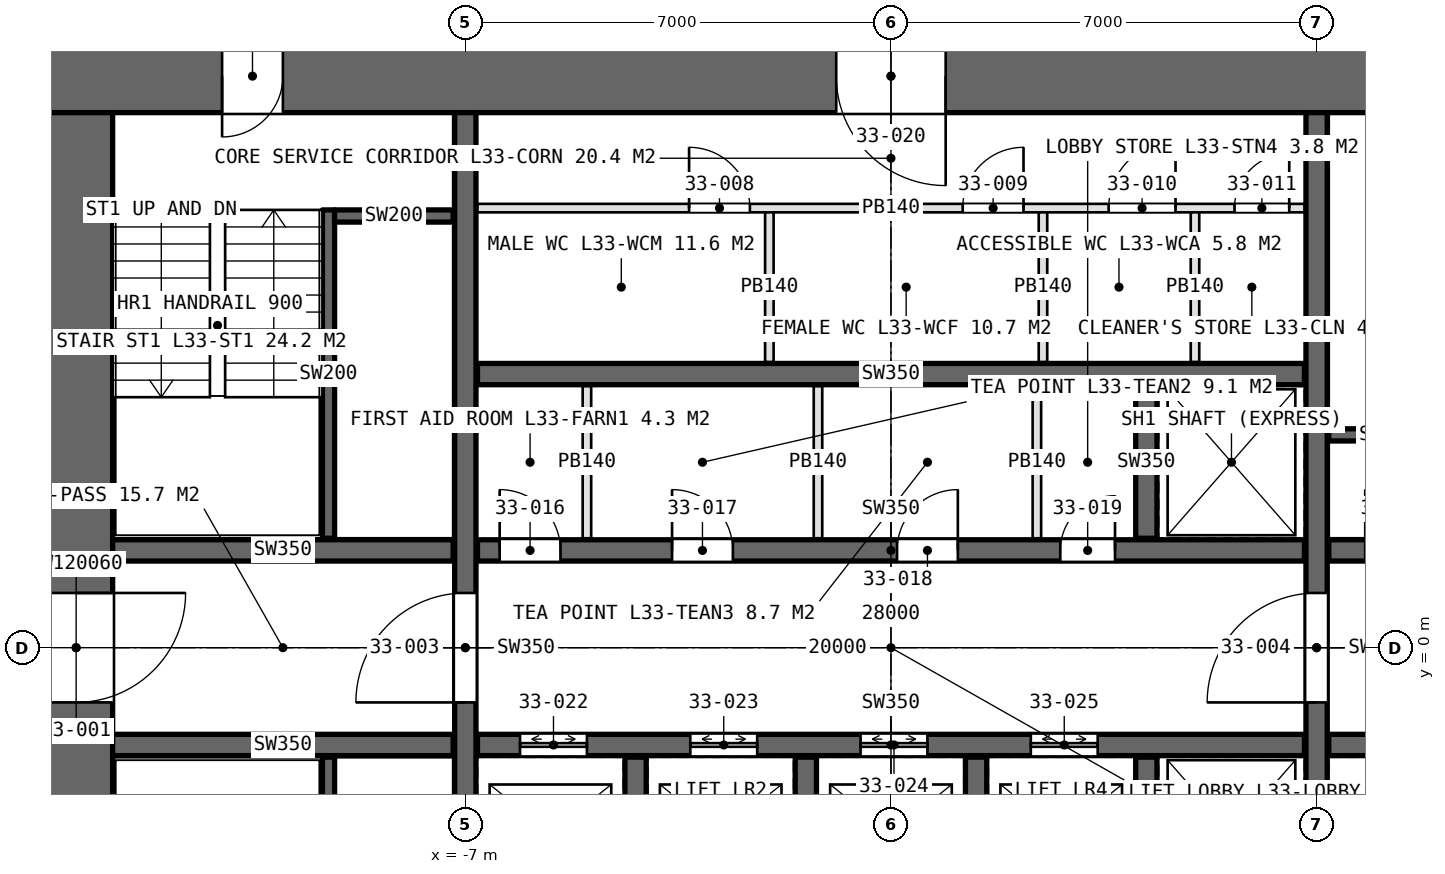
"""IFC4 building model, lengths in metres.
Left out: names, types, materials, properties, quantities, classifications, styles, units other than length and angle.
Written with IfcOpenShell. Run it as: python <this file> out.ifc"""

import sys

from ifc_helpers import new_model, si_unit, direction, frame, frame_2d, origin, place, context, subcontext, project, spatial, rectangle, extrude, element, fill, save


model = new_model("IFC4")
c1 = context("Model", 3, precision=1e-05, world=origin(), true_north=direction((0.0, 1.0)))
c2 = subcontext(c1, "Body", "Model", "MODEL_VIEW")
j1 = project(units=[si_unit("LENGTHUNIT", "METRE"), si_unit("PLANEANGLEUNIT", "RADIAN")], contexts=[c1])
p1 = place(None, origin())
s1 = spatial("IfcSite", under=j1, at=p1, CompositionType="ELEMENT")
p2 = place(p1, origin())
s2 = spatial("IfcBuilding", under=s1, at=p2, CompositionType="ELEMENT")
p3 = place(p2, frame((0.0, 0.0, 155.4)))
s3 = spatial("IfcBuildingStorey", under=s2, at=p3, CompositionType="ELEMENT", Elevation=155.4)
p4 = place(p3, frame((14.0, 9.4, 0.0), z_axis=(0.0, 0.0, 1.0), x_axis=(-1.0, 0.0, 0.0)))
e1 = element("IfcWall", 1, at=p4, inside=s3, PredefinedType="SHEAR", context=c2, shape_type="SweptSolid", body=[
    extrude(rectangle(XDim=28.0, YDim=1.2, at=frame_2d((14.0, 0.0))), origin(), (0.0, 0.0, 1.0), 4.2),
])
p5 = place(p4, frame((24.0, 0.0, 0.0)))
e2 = element("IfcOpeningElement", 2, at=p5, cuts=e1, PredefinedType="OPENING", context=c2, shape_type="SweptSolid", body=[
    extrude(rectangle(XDim=1.0, YDim=2.4, at=frame_2d((0.5, 1.2))), frame((0.0, 0.61, 0.0), z_axis=(0.0, -1.0, 0.0), x_axis=(1.0, 0.0, 0.0)), (0.0, 0.0, 1.0), 1.22),
])
p6 = place(p4, frame((13.1, 0.0, 0.0)))
e3 = element("IfcOpeningElement", 3, at=p6, cuts=e1, PredefinedType="OPENING", context=c2, shape_type="SweptSolid", body=[
    extrude(rectangle(XDim=1.8, YDim=2.4, at=frame_2d((0.9, 1.2))), frame((0.0, 0.61, 0.0), z_axis=(0.0, -1.0, 0.0), x_axis=(1.0, 0.0, 0.0)), (0.0, 0.0, 1.0), 1.22),
])
p7 = place(p3, frame((-13.4, 8.8, 0.0), z_axis=(0.0, 0.0, 1.0), x_axis=(0.0, -1.0, 0.0)))
e4 = element("IfcWall", 4, at=p7, inside=s3, PredefinedType="SHEAR", context=c2, shape_type="SweptSolid", body=[
    extrude(rectangle(XDim=17.6, YDim=1.2, at=frame_2d((8.8, 0.0))), origin(), (0.0, 0.0, 1.0), 4.2),
])
p8 = place(p7, frame((7.9, 0.0, 0.0)))
e5 = element("IfcOpeningElement", 5, at=p8, cuts=e4, PredefinedType="OPENING", context=c2, shape_type="SweptSolid", body=[
    extrude(rectangle(XDim=1.8, YDim=2.4, at=frame_2d((0.9, 1.2))), frame((0.0, 0.61, 0.0), z_axis=(0.0, -1.0, 0.0), x_axis=(1.0, 0.0, 0.0)), (0.0, 0.0, 1.0), 1.22),
])
p9 = place(p7, frame((16.5, 0.0, 0.0)))
e6 = element("IfcOpeningElement", 6, at=p9, cuts=e4, PredefinedType="OPENING", context=c2, shape_type="SweptSolid", body=[
    extrude(rectangle(XDim=1.0, YDim=2.4, at=frame_2d((0.5, 1.2))), frame((0.0, 0.61, 0.0), z_axis=(0.0, -1.0, 0.0), x_axis=(1.0, 0.0, 0.0)), (0.0, 0.0, 1.0), 1.22),
])
p10 = place(p3, frame((-7.0, -8.8, 0.0), z_axis=(0.0, 0.0, 1.0), x_axis=(0.0, 1.0, 0.0)))
e7 = element("IfcWall", 7, at=p10, inside=s3, PredefinedType="SHEAR", context=c2, shape_type="SweptSolid", body=[
    extrude(rectangle(XDim=17.6, YDim=0.35, at=frame_2d((8.8, 0.0))), origin(), (0.0, 0.0, 1.0), 4.2),
])
p11 = place(p10, frame((7.9, 0.0, 0.0)))
e8 = element("IfcOpeningElement", 8, at=p11, cuts=e7, PredefinedType="OPENING", context=c2, shape_type="SweptSolid", body=[
    extrude(rectangle(XDim=1.8, YDim=2.4, at=frame_2d((0.9, 1.2))), frame((0.0, 0.185, 0.0), z_axis=(0.0, -1.0, 0.0), x_axis=(1.0, 0.0, 0.0)), (0.0, 0.0, 1.0), 0.37),
])
p12 = place(p3, frame((7.0, -8.8, 0.0), z_axis=(0.0, 0.0, 1.0), x_axis=(0.0, 1.0, 0.0)))
e9 = element("IfcWall", 9, at=p12, inside=s3, PredefinedType="SHEAR", context=c2, shape_type="SweptSolid", body=[
    extrude(rectangle(XDim=17.6, YDim=0.35, at=frame_2d((8.8, 0.0))), origin(), (0.0, 0.0, 1.0), 4.2),
])
p13 = place(p12, frame((7.9, 0.0, 0.0)))
e10 = element("IfcOpeningElement", 10, at=p13, cuts=e9, PredefinedType="OPENING", context=c2, shape_type="SweptSolid", body=[
    extrude(rectangle(XDim=1.8, YDim=2.4, at=frame_2d((0.9, 1.2))), frame((0.0, 0.185, 0.0), z_axis=(0.0, -1.0, 0.0), x_axis=(1.0, 0.0, 0.0)), (0.0, 0.0, 1.0), 0.37),
])
p14 = place(p3, frame((-6.8, 1.6, 0.0), z_axis=(0.0, 0.0, 1.0), x_axis=(1.0, 0.0, 0.0)))
e11 = element("IfcWall", 11, at=p14, inside=s3, PredefinedType="SHEAR", context=c2, shape_type="SweptSolid", body=[
    extrude(rectangle(XDim=13.6, YDim=0.35, at=frame_2d((6.8, 0.0))), origin(), (0.0, 0.0, 1.0), 4.2),
])
p15 = place(p14, frame((0.365, 0.0, 0.0)))
e12 = element("IfcOpeningElement", 12, at=p15, cuts=e11, PredefinedType="OPENING", context=c2, shape_type="SweptSolid", body=[
    extrude(rectangle(XDim=1.0, YDim=2.4, at=frame_2d((0.5, 1.2))), frame((0.0, 0.185, 0.0), z_axis=(0.0, -1.0, 0.0), x_axis=(1.0, 0.0, 0.0)), (0.0, 0.0, 1.0), 0.37),
])
p16 = place(p14, frame((3.2, 0.0, 0.0)))
e13 = element("IfcOpeningElement", 13, at=p16, cuts=e11, PredefinedType="OPENING", context=c2, shape_type="SweptSolid", body=[
    extrude(rectangle(XDim=1.0, YDim=2.4, at=frame_2d((0.5, 1.2))), frame((0.0, 0.185, 0.0), z_axis=(0.0, -1.0, 0.0), x_axis=(1.0, 0.0, 0.0)), (0.0, 0.0, 1.0), 0.37),
])
p17 = place(p14, frame((6.9, 0.0, 0.0)))
e14 = element("IfcOpeningElement", 14, at=p17, cuts=e11, PredefinedType="OPENING", context=c2, shape_type="SweptSolid", body=[
    extrude(rectangle(XDim=1.0, YDim=2.4, at=frame_2d((0.5, 1.2))), frame((0.0, 0.185, 0.0), z_axis=(0.0, -1.0, 0.0), x_axis=(1.0, 0.0, 0.0)), (0.0, 0.0, 1.0), 0.37),
])
p18 = place(p14, frame((9.585, 0.0, 0.0)))
e15 = element("IfcOpeningElement", 15, at=p18, cuts=e11, PredefinedType="OPENING", context=c2, shape_type="SweptSolid", body=[
    extrude(rectangle(XDim=0.9, YDim=2.4, at=frame_2d((0.45, 1.2))), frame((0.0, 0.185, 0.0), z_axis=(0.0, -1.0, 0.0), x_axis=(1.0, 0.0, 0.0)), (0.0, 0.0, 1.0), 0.37),
])
p19 = place(p3, frame((-6.8, -1.6, 0.0), z_axis=(0.0, 0.0, 1.0), x_axis=(1.0, 0.0, 0.0)))
e16 = element("IfcWall", 16, at=p19, inside=s3, PredefinedType="SHEAR", context=c2, shape_type="SweptSolid", body=[
    extrude(rectangle(XDim=13.6, YDim=0.35, at=frame_2d((6.8, 0.0))), origin(), (0.0, 0.0, 1.0), 4.2),
])
p20 = place(p19, frame((0.7, 0.0, 0.0)))
e17 = element("IfcOpeningElement", 17, at=p20, cuts=e16, PredefinedType="OPENING", context=c2, shape_type="SweptSolid", body=[
    extrude(rectangle(XDim=1.1, YDim=2.4, at=frame_2d((0.55, 1.2))), frame((0.0, 0.185, 0.0), z_axis=(0.0, -1.0, 0.0), x_axis=(1.0, 0.0, 0.0)), (0.0, 0.0, 1.0), 0.37),
])
p21 = place(p19, frame((3.5, 0.0, 0.0)))
e18 = element("IfcOpeningElement", 18, at=p21, cuts=e16, PredefinedType="OPENING", context=c2, shape_type="SweptSolid", body=[
    extrude(rectangle(XDim=1.1, YDim=2.4, at=frame_2d((0.55, 1.2))), frame((0.0, 0.185, 0.0), z_axis=(0.0, -1.0, 0.0), x_axis=(1.0, 0.0, 0.0)), (0.0, 0.0, 1.0), 0.37),
])
p22 = place(p19, frame((6.3, 0.0, 0.0)))
e19 = element("IfcOpeningElement", 19, at=p22, cuts=e16, PredefinedType="OPENING", context=c2, shape_type="SweptSolid", body=[
    extrude(rectangle(XDim=1.1, YDim=2.4, at=frame_2d((0.55, 1.2))), frame((0.0, 0.185, 0.0), z_axis=(0.0, -1.0, 0.0), x_axis=(1.0, 0.0, 0.0)), (0.0, 0.0, 1.0), 0.37),
])
p23 = place(p19, frame((9.1, 0.0, 0.0)))
e20 = element("IfcOpeningElement", 20, at=p23, cuts=e16, PredefinedType="OPENING", context=c2, shape_type="SweptSolid", body=[
    extrude(rectangle(XDim=1.1, YDim=2.4, at=frame_2d((0.55, 1.2))), frame((0.0, 0.185, 0.0), z_axis=(0.0, -1.0, 0.0), x_axis=(1.0, 0.0, 0.0)), (0.0, 0.0, 1.0), 0.37),
])
p24 = place(p3, frame((-6.8, 4.5, 0.0), z_axis=(0.0, 0.0, 1.0), x_axis=(1.0, 0.0, 0.0)))
e21 = element("IfcWall", 21, at=p24, inside=s3, PredefinedType="SHEAR", context=c2, shape_type="SweptSolid", body=[
    extrude(rectangle(XDim=13.6, YDim=0.35, at=frame_2d((6.8, 0.0))), origin(), (0.0, 0.0, 1.0), 4.2),
])
for number, where, z_axis, x_axis in (
    (22, (-12.8, 1.6, 0.0), (0.0, 0.0, 1.0), (1.0, 0.0, 0.0)),
    (23, (-12.8, -1.6, 0.0), (0.0, 0.0, 1.0), (1.0, 0.0, 0.0)),
):
    element("IfcWall", number, at=place(p3, frame(where, z_axis=z_axis, x_axis=x_axis)), inside=s3, PredefinedType="SHEAR", context=c2, shape_type="SweptSolid", body=[
        extrude(rectangle(XDim=5.6, YDim=0.35, at=frame_2d((2.8, 0.0))), origin(), (0.0, 0.0, 1.0), 4.2),
    ])
p25 = place(p3, frame((7.2, 1.6, 0.0), z_axis=(0.0, 0.0, 1.0), x_axis=(1.0, 0.0, 0.0)))
e24 = element("IfcWall", 24, at=p25, inside=s3, PredefinedType="SHEAR", context=c2, shape_type="SweptSolid", body=[
    extrude(rectangle(XDim=5.6, YDim=0.35, at=frame_2d((2.8, 0.0))), origin(), (0.0, 0.0, 1.0), 4.2),
])
p26 = place(p25, frame((0.6, 0.0, 0.0)))
e25 = element("IfcOpeningElement", 25, at=p26, cuts=e24, PredefinedType="OPENING", context=c2, shape_type="SweptSolid", body=[
    extrude(rectangle(XDim=1.0, YDim=2.4, at=frame_2d((0.5, 1.2))), frame((0.0, 0.185, 0.0), z_axis=(0.0, -1.0, 0.0), x_axis=(1.0, 0.0, 0.0)), (0.0, 0.0, 1.0), 0.37),
])
p27 = place(p3, frame((7.2, -1.6, 0.0), z_axis=(0.0, 0.0, 1.0), x_axis=(1.0, 0.0, 0.0)))
e26 = element("IfcWall", 26, at=p27, inside=s3, PredefinedType="SHEAR", context=c2, shape_type="SweptSolid", body=[
    extrude(rectangle(XDim=5.6, YDim=0.35, at=frame_2d((2.8, 0.0))), origin(), (0.0, 0.0, 1.0), 4.2),
])
p28 = place(p27, frame((0.9, 0.0, 0.0)))
e27 = element("IfcOpeningElement", 27, at=p28, cuts=e26, PredefinedType="OPENING", context=c2, shape_type="SweptSolid", body=[
    extrude(rectangle(XDim=1.3, YDim=2.4, at=frame_2d((0.65, 1.2))), frame((0.0, 0.185, 0.0), z_axis=(0.0, -1.0, 0.0), x_axis=(1.0, 0.0, 0.0)), (0.0, 0.0, 1.0), 0.37),
])
p29 = place(p27, frame((3.9, 0.0, 0.0)))
e28 = element("IfcOpeningElement", 28, at=p29, cuts=e26, PredefinedType="OPENING", context=c2, shape_type="SweptSolid", body=[
    extrude(rectangle(XDim=1.3, YDim=2.4, at=frame_2d((0.65, 1.2))), frame((0.0, 0.185, 0.0), z_axis=(0.0, -1.0, 0.0), x_axis=(1.0, 0.0, 0.0)), (0.0, 0.0, 1.0), 0.37),
])
for number, where, z_axis, x_axis in (
    (29, (-4.2, -4.3, 0.0), (0.0, 0.0, 1.0), (0.0, 1.0, 0.0)),
    (30, (-1.4, -4.3, 0.0), (0.0, 0.0, 1.0), (0.0, 1.0, 0.0)),
    (31, (1.4, -4.3, 0.0), (0.0, 0.0, 1.0), (0.0, 1.0, 0.0)),
    (32, (4.2, 1.8, 0.0), (0.0, 0.0, 1.0), (0.0, 1.0, 0.0)),
    (33, (4.2, -4.3, 0.0), (0.0, 0.0, 1.0), (0.0, 1.0, 0.0)),
):
    element("IfcWall", number, at=place(p3, frame(where, z_axis=z_axis, x_axis=x_axis)), inside=s3, PredefinedType="SHEAR", context=c2, shape_type="SweptSolid", body=[
        extrude(rectangle(XDim=2.5, YDim=0.35, at=frame_2d((1.25, 0.0))), origin(), (0.0, 0.0, 1.0), 4.2),
    ])
p30 = place(p3, frame((-6.8, 7.23, 0.0), z_axis=(0.0, 0.0, 1.0), x_axis=(1.0, 0.0, 0.0)))
e34 = element("IfcWall", 34, at=p30, inside=s3, PredefinedType="PARTITIONING", context=c2, shape_type="SweptSolid", body=[
    extrude(rectangle(XDim=13.6, YDim=0.14, at=frame_2d((6.8, 0.0))), origin(), (0.0, 0.0, 1.0), 3.95),
])
p31 = place(p30, frame((3.48, 0.0, 0.0)))
e35 = element("IfcOpeningElement", 35, at=p31, cuts=e34, PredefinedType="OPENING", context=c2, shape_type="SweptSolid", body=[
    extrude(rectangle(XDim=1.0, YDim=2.4, at=frame_2d((0.5, 1.2))), frame((0.0, 0.08, 0.0), z_axis=(0.0, -1.0, 0.0), x_axis=(1.0, 0.0, 0.0)), (0.0, 0.0, 1.0), 0.16),
])
p32 = place(p30, frame((7.98, 0.0, 0.0)))
e36 = element("IfcOpeningElement", 36, at=p32, cuts=e34, PredefinedType="OPENING", context=c2, shape_type="SweptSolid", body=[
    extrude(rectangle(XDim=1.0, YDim=2.4, at=frame_2d((0.5, 1.2))), frame((0.0, 0.08, 0.0), z_axis=(0.0, -1.0, 0.0), x_axis=(1.0, 0.0, 0.0)), (0.0, 0.0, 1.0), 0.16),
])
p33 = place(p30, frame((10.38, 0.0, 0.0)))
e37 = element("IfcOpeningElement", 37, at=p33, cuts=e34, PredefinedType="OPENING", context=c2, shape_type="SweptSolid", body=[
    extrude(rectangle(XDim=1.1, YDim=2.4, at=frame_2d((0.55, 1.2))), frame((0.0, 0.08, 0.0), z_axis=(0.0, -1.0, 0.0), x_axis=(1.0, 0.0, 0.0)), (0.0, 0.0, 1.0), 0.16),
])
p34 = place(p30, frame((12.45, 0.0, 0.0)))
e38 = element("IfcOpeningElement", 38, at=p34, cuts=e34, PredefinedType="OPENING", context=c2, shape_type="SweptSolid", body=[
    extrude(rectangle(XDim=0.9, YDim=2.4, at=frame_2d((0.45, 1.2))), frame((0.0, 0.08, 0.0), z_axis=(0.0, -1.0, 0.0), x_axis=(1.0, 0.0, 0.0)), (0.0, 0.0, 1.0), 0.16),
])
for number, where, z_axis, x_axis in (
    (39, (-2.0, 4.7, 0.0), (0.0, 0.0, 1.0), (0.0, 1.0, 0.0)),
    (40, (2.5, 4.7, 0.0), (0.0, 0.0, 1.0), (0.0, 1.0, 0.0)),
    (41, (5.0, 4.7, 0.0), (0.0, 0.0, 1.0), (0.0, 1.0, 0.0)),
):
    element("IfcWall", number, at=place(p3, frame(where, z_axis=z_axis, x_axis=x_axis)), inside=s3, PredefinedType="PARTITIONING", context=c2, shape_type="SweptSolid", body=[
        extrude(rectangle(XDim=2.46, YDim=0.14, at=frame_2d((1.23, 0.0))), origin(), (0.0, 0.0, 1.0), 3.95),
    ])
for number, where, z_axis, x_axis in (
    (42, (-5.0, 1.8, 0.0), (0.0, 0.0, 1.0), (0.0, 1.0, 0.0)),
    (43, (-1.2, 1.8, 0.0), (0.0, 0.0, 1.0), (0.0, 1.0, 0.0)),
    (44, (2.4, 1.8, 0.0), (0.0, 0.0, 1.0), (0.0, 1.0, 0.0)),
):
    element("IfcWall", number, at=place(p3, frame(where, z_axis=z_axis, x_axis=x_axis)), inside=s3, PredefinedType="PARTITIONING", context=c2, shape_type="SweptSolid", body=[
        extrude(rectangle(XDim=2.5, YDim=0.14, at=frame_2d((1.25, 0.0))), origin(), (0.0, 0.0, 1.0), 3.95),
    ])
p35 = place(p3, frame((-9.25, 7.2, 0.0), z_axis=(0.0, 0.0, 1.0), x_axis=(0.0, -1.0, 0.0)))
e45 = element("IfcWall", 45, at=p35, inside=s3, PredefinedType="SOLIDWALL", context=c2, shape_type="SweptSolid", body=[
    extrude(rectangle(XDim=5.4, YDim=0.2, at=frame_2d((2.7, 0.0))), origin(), (0.0, 0.0, 1.0), 4.2),
])
p36 = place(p3, frame((-9.15, 7.1, 0.0), z_axis=(0.0, 0.0, 1.0), x_axis=(1.0, 0.0, 0.0)))
e46 = element("IfcWall", 46, at=p36, inside=s3, PredefinedType="SOLIDWALL", context=c2, shape_type="SweptSolid", body=[
    extrude(rectangle(XDim=1.95, YDim=0.2, at=frame_2d((0.975, 0.0))), origin(), (0.0, 0.0, 1.0), 4.2),
])
p37 = place(p3, frame((-9.25, -7.2, 0.0), z_axis=(0.0, 0.0, 1.0), x_axis=(0.0, 1.0, 0.0)))
e47 = element("IfcWall", 47, at=p37, inside=s3, PredefinedType="SOLIDWALL", context=c2, shape_type="SweptSolid", body=[
    extrude(rectangle(XDim=5.4, YDim=0.2, at=frame_2d((2.7, 0.0))), origin(), (0.0, 0.0, 1.0), 4.2),
])
p38 = place(p3, frame((9.15, 3.5, 0.0), z_axis=(0.0, 0.0, 1.0), x_axis=(-1.0, 0.0, 0.0)))
e48 = element("IfcWall", 48, at=p38, inside=s3, PredefinedType="SOLIDWALL", context=c2, shape_type="SweptSolid", body=[
    extrude(rectangle(XDim=1.95, YDim=0.2, at=frame_2d((0.975, 0.0))), origin(), (0.0, 0.0, 1.0), 4.2),
])
p39 = place(p8, origin())
e49 = element("IfcDoor", 49, at=p39, inside=s3, OperationType="DOUBLE_DOOR_SINGLE_SWING", PredefinedType="DOOR", context=c2, shape_type="SweptSolid", body=[
    extrude(rectangle(XDim=1.8, YDim=2.4, at=frame_2d((0.9, 1.2))), frame((0.0, 0.025, 0.0), z_axis=(0.0, -1.0, 0.0), x_axis=(1.0, 0.0, 0.0)), (0.0, 0.0, 1.0), 0.05),
])
fill(e5, e49)
p40 = place(p11, origin())
e50 = element("IfcDoor", 50, at=p40, inside=s3, OperationType="DOUBLE_DOOR_SINGLE_SWING", PredefinedType="DOOR", context=c2, shape_type="SweptSolid", body=[
    extrude(rectangle(XDim=1.8, YDim=2.4, at=frame_2d((0.9, 1.2))), frame((0.0, 0.025, 0.0), z_axis=(0.0, -1.0, 0.0), x_axis=(1.0, 0.0, 0.0)), (0.0, 0.0, 1.0), 0.05),
])
fill(e8, e50)
p41 = place(p13, origin())
e51 = element("IfcDoor", 51, at=p41, inside=s3, OperationType="DOUBLE_DOOR_SINGLE_SWING", PredefinedType="DOOR", context=c2, shape_type="SweptSolid", body=[
    extrude(rectangle(XDim=1.8, YDim=2.4, at=frame_2d((0.9, 1.2))), frame((0.0, 0.025, 0.0), z_axis=(0.0, -1.0, 0.0), x_axis=(1.0, 0.0, 0.0)), (0.0, 0.0, 1.0), 0.05),
])
fill(e10, e51)
p42 = place(p5, origin())
e52 = element("IfcDoor", 52, at=p42, inside=s3, OperationType="SINGLE_SWING_RIGHT", PredefinedType="DOOR", context=c2, shape_type="SweptSolid", body=[
    extrude(rectangle(XDim=1.0, YDim=2.4, at=frame_2d((0.5, 1.2))), frame((0.0, 0.025, 0.0), z_axis=(0.0, -1.0, 0.0), x_axis=(1.0, 0.0, 0.0)), (0.0, 0.0, 1.0), 0.05),
])
fill(e2, e52)
p43 = place(p31, origin())
e53 = element("IfcDoor", 53, at=p43, inside=s3, OperationType="SINGLE_SWING_LEFT", PredefinedType="DOOR", context=c2, shape_type="SweptSolid", body=[
    extrude(rectangle(XDim=1.0, YDim=2.4, at=frame_2d((0.5, 1.2))), frame((0.0, 0.025, 0.0), z_axis=(0.0, -1.0, 0.0), x_axis=(1.0, 0.0, 0.0)), (0.0, 0.0, 1.0), 0.05),
])
fill(e35, e53)
p44 = place(p32, origin())
e54 = element("IfcDoor", 54, at=p44, inside=s3, OperationType="SINGLE_SWING_RIGHT", PredefinedType="DOOR", context=c2, shape_type="SweptSolid", body=[
    extrude(rectangle(XDim=1.0, YDim=2.4, at=frame_2d((0.5, 1.2))), frame((0.0, 0.025, 0.0), z_axis=(0.0, -1.0, 0.0), x_axis=(1.0, 0.0, 0.0)), (0.0, 0.0, 1.0), 0.05),
])
fill(e36, e54)
p45 = place(p33, origin())
e55 = element("IfcDoor", 55, at=p45, inside=s3, OperationType="SINGLE_SWING_RIGHT", PredefinedType="DOOR", context=c2, shape_type="SweptSolid", body=[
    extrude(rectangle(XDim=1.1, YDim=2.4, at=frame_2d((0.55, 1.2))), frame((0.0, 0.025, 0.0), z_axis=(0.0, -1.0, 0.0), x_axis=(1.0, 0.0, 0.0)), (0.0, 0.0, 1.0), 0.05),
])
fill(e37, e55)
p46 = place(p34, origin())
e56 = element("IfcDoor", 56, at=p46, inside=s3, OperationType="SINGLE_SWING_RIGHT", PredefinedType="DOOR", context=c2, shape_type="SweptSolid", body=[
    extrude(rectangle(XDim=0.9, YDim=2.4, at=frame_2d((0.45, 1.2))), frame((0.0, 0.025, 0.0), z_axis=(0.0, -1.0, 0.0), x_axis=(1.0, 0.0, 0.0)), (0.0, 0.0, 1.0), 0.05),
])
fill(e38, e56)
p47 = place(p15, origin())
e57 = element("IfcDoor", 57, at=p47, inside=s3, OperationType="SINGLE_SWING_LEFT", PredefinedType="DOOR", context=c2, shape_type="SweptSolid", body=[
    extrude(rectangle(XDim=1.0, YDim=2.4, at=frame_2d((0.5, 1.2))), frame((0.0, 0.025, 0.0), z_axis=(0.0, -1.0, 0.0), x_axis=(1.0, 0.0, 0.0)), (0.0, 0.0, 1.0), 0.05),
])
fill(e12, e57)
p48 = place(p16, origin())
e58 = element("IfcDoor", 58, at=p48, inside=s3, OperationType="SINGLE_SWING_LEFT", PredefinedType="DOOR", context=c2, shape_type="SweptSolid", body=[
    extrude(rectangle(XDim=1.0, YDim=2.4, at=frame_2d((0.5, 1.2))), frame((0.0, 0.025, 0.0), z_axis=(0.0, -1.0, 0.0), x_axis=(1.0, 0.0, 0.0)), (0.0, 0.0, 1.0), 0.05),
])
fill(e13, e58)
p49 = place(p17, origin())
e59 = element("IfcDoor", 59, at=p49, inside=s3, OperationType="SINGLE_SWING_RIGHT", PredefinedType="DOOR", context=c2, shape_type="SweptSolid", body=[
    extrude(rectangle(XDim=1.0, YDim=2.4, at=frame_2d((0.5, 1.2))), frame((0.0, 0.025, 0.0), z_axis=(0.0, -1.0, 0.0), x_axis=(1.0, 0.0, 0.0)), (0.0, 0.0, 1.0), 0.05),
])
fill(e14, e59)
p50 = place(p18, origin())
e60 = element("IfcDoor", 60, at=p50, inside=s3, OperationType="SINGLE_SWING_RIGHT", PredefinedType="DOOR", context=c2, shape_type="SweptSolid", body=[
    extrude(rectangle(XDim=0.9, YDim=2.4, at=frame_2d((0.45, 1.2))), frame((0.0, 0.025, 0.0), z_axis=(0.0, -1.0, 0.0), x_axis=(1.0, 0.0, 0.0)), (0.0, 0.0, 1.0), 0.05),
])
fill(e15, e60)
p51 = place(p6, origin())
e61 = element("IfcDoor", 61, at=p51, inside=s3, OperationType="DOUBLE_DOOR_SINGLE_SWING", PredefinedType="DOOR", context=c2, shape_type="SweptSolid", body=[
    extrude(rectangle(XDim=1.8, YDim=2.4, at=frame_2d((0.9, 1.2))), frame((0.0, 0.025, 0.0), z_axis=(0.0, -1.0, 0.0), x_axis=(1.0, 0.0, 0.0)), (0.0, 0.0, 1.0), 0.05),
])
fill(e3, e61)
p52 = place(p20, origin())
e62 = element("IfcDoor", 62, at=p52, inside=s3, OperationType="DOUBLE_DOOR_SLIDING", PredefinedType="DOOR", context=c2, shape_type="SweptSolid", body=[
    extrude(rectangle(XDim=1.1, YDim=2.4, at=frame_2d((0.55, 1.2))), frame((0.0, 0.025, 0.0), z_axis=(0.0, -1.0, 0.0), x_axis=(1.0, 0.0, 0.0)), (0.0, 0.0, 1.0), 0.05),
])
fill(e17, e62)
p53 = place(p21, origin())
e63 = element("IfcDoor", 63, at=p53, inside=s3, OperationType="DOUBLE_DOOR_SLIDING", PredefinedType="DOOR", context=c2, shape_type="SweptSolid", body=[
    extrude(rectangle(XDim=1.1, YDim=2.4, at=frame_2d((0.55, 1.2))), frame((0.0, 0.025, 0.0), z_axis=(0.0, -1.0, 0.0), x_axis=(1.0, 0.0, 0.0)), (0.0, 0.0, 1.0), 0.05),
])
fill(e18, e63)
p54 = place(p22, origin())
e64 = element("IfcDoor", 64, at=p54, inside=s3, OperationType="DOUBLE_DOOR_SLIDING", PredefinedType="DOOR", context=c2, shape_type="SweptSolid", body=[
    extrude(rectangle(XDim=1.1, YDim=2.4, at=frame_2d((0.55, 1.2))), frame((0.0, 0.025, 0.0), z_axis=(0.0, -1.0, 0.0), x_axis=(1.0, 0.0, 0.0)), (0.0, 0.0, 1.0), 0.05),
])
fill(e19, e64)
p55 = place(p23, origin())
e65 = element("IfcDoor", 65, at=p55, inside=s3, OperationType="DOUBLE_DOOR_SLIDING", PredefinedType="DOOR", context=c2, shape_type="SweptSolid", body=[
    extrude(rectangle(XDim=1.1, YDim=2.4, at=frame_2d((0.55, 1.2))), frame((0.0, 0.025, 0.0), z_axis=(0.0, -1.0, 0.0), x_axis=(1.0, 0.0, 0.0)), (0.0, 0.0, 1.0), 0.05),
])
fill(e20, e65)
save(model, sys.argv[1])
